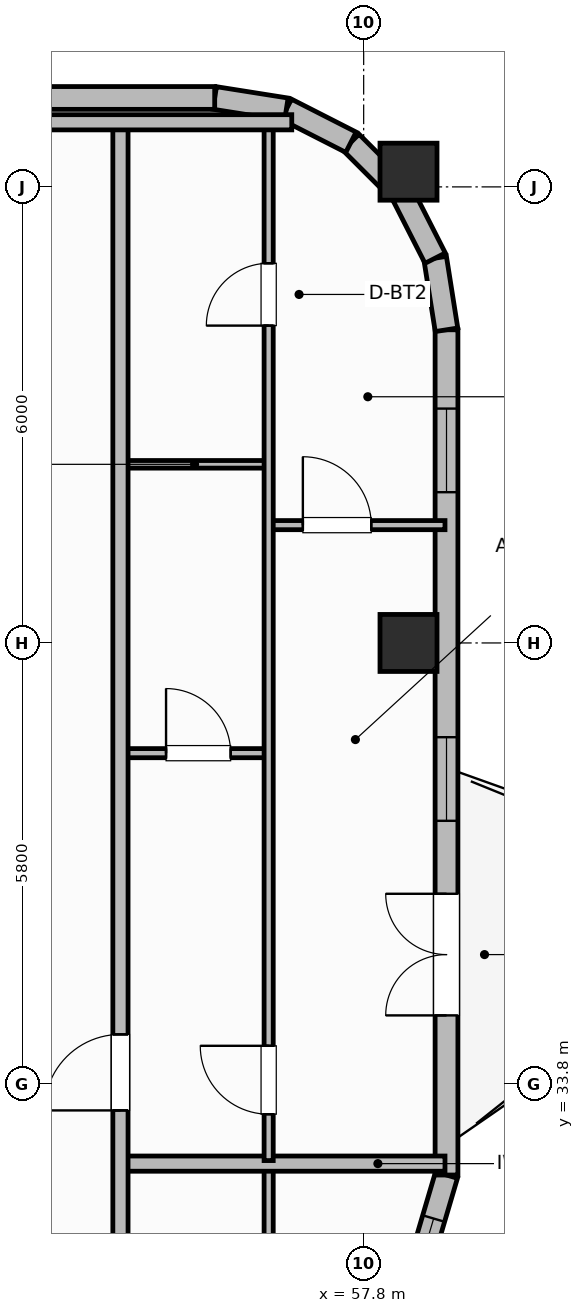
"""IFC4 building model, lengths in metres.
Left out: names, types, materials, properties, quantities, classifications, styles, units other than length and angle.
Written with IfcOpenShell. Run it as: python <this file> out.ifc"""

import sys

from ifc_helpers import new_model, si_unit, direction, frame, frame_2d, origin, origin_2d, place, context, subcontext, project, spatial, rectangle, extrude, element, fill, save


model = new_model("IFC4")
c1 = context("Model", 3, precision=1e-05, world=origin(), true_north=direction((0.0, 1.0)))
c2 = subcontext(c1, "Body", "Model", "MODEL_VIEW")
j1 = project(units=[si_unit("LENGTHUNIT", "METRE"), si_unit("PLANEANGLEUNIT", "RADIAN")], contexts=[c1])
p1 = place(None, origin())
s1 = spatial("IfcSite", under=j1, at=p1, CompositionType="ELEMENT")
p2 = place(p1, origin())
s2 = spatial("IfcBuilding", under=s1, at=p2, CompositionType="ELEMENT")
p3 = place(p2, frame((0.0, 0.0, 282.4)))
s3 = spatial("IfcBuildingStorey", under=s2, at=p3, CompositionType="ELEMENT", Elevation=282.4)
for number, where, z_axis, x_axis in (
    (1, (58.39, 39.6, 0.0), (0.0, 0.0, 1.0), (1.0, 0.0, 0.0)),
    (2, (58.39, 45.8, 0.0), (0.0, 0.0, 1.0), (1.0, 0.0, 0.0)),
):
    element("IfcColumn", number, at=place(p3, frame(where, z_axis=z_axis, x_axis=x_axis)), inside=s3, PredefinedType="COLUMN", context=c2, shape_type="SweptSolid", body=[
        extrude(rectangle(XDim=0.75, YDim=0.75, at=origin_2d()), origin(), (0.0, 0.0, 1.0), 3.7),
    ])
p4 = place(p3, frame((58.24, 30.4, 0.0), z_axis=(0.0, 0.0, 1.0), x_axis=(0.28328385701, 0.959036107953, 0.0)))
e3 = element("IfcWall", 3, at=p4, inside=s3, PredefinedType="SOLIDWALL", context=c2, shape_type="SweptSolid", body=[
    extrude(rectangle(XDim=2.294, YDim=0.3, at=frame_2d((1.147, 0.0))), origin(), (0.0, 0.0, 1.0), 2.73),
])
p5 = place(p4, frame((0.597, 0.0, 0.92)))
e4 = element("IfcOpeningElement", 4, at=p5, cuts=e3, PredefinedType="OPENING", context=c2, shape_type="SweptSolid", body=[
    extrude(rectangle(XDim=1.1, YDim=1.65, at=frame_2d((0.55, 0.825))), frame((0.0, 0.16, 0.0), z_axis=(0.0, -1.0, 0.0), x_axis=(1.0, 0.0, 0.0)), (0.0, 0.0, 1.0), 0.32),
])
p6 = place(p3, frame((58.89, 32.6, 0.0), z_axis=(0.0, 0.0, 1.0), x_axis=(0.0, 1.0, 0.0)))
e5 = element("IfcWall", 5, at=p6, inside=s3, PredefinedType="SOLIDWALL", context=c2, shape_type="SweptSolid", body=[
    extrude(rectangle(XDim=11.12, YDim=0.3, at=frame_2d((5.56, 0.0))), origin(), (0.0, 0.0, 1.0), 2.73),
])
p7 = place(p6, frame((2.1, 0.0, 0.0)))
e6 = element("IfcOpeningElement", 6, at=p7, cuts=e5, PredefinedType="OPENING", context=c2, shape_type="SweptSolid", body=[
    extrude(rectangle(XDim=1.6, YDim=2.1, at=frame_2d((0.8, 1.05))), frame((0.0, 0.16, 0.0), z_axis=(0.0, -1.0, 0.0), x_axis=(1.0, 0.0, 0.0)), (0.0, 0.0, 1.0), 0.32),
])
p8 = place(p6, frame((4.66, 0.0, 0.95)))
e7 = element("IfcOpeningElement", 7, at=p8, cuts=e5, PredefinedType="OPENING", context=c2, shape_type="SweptSolid", body=[
    extrude(rectangle(XDim=1.1, YDim=1.65, at=frame_2d((0.55, 0.825))), frame((0.0, 0.16, 0.0), z_axis=(0.0, -1.0, 0.0), x_axis=(1.0, 0.0, 0.0)), (0.0, 0.0, 1.0), 0.32),
])
p9 = place(p6, frame((8.983, 0.0, 0.95)))
e8 = element("IfcOpeningElement", 8, at=p9, cuts=e5, PredefinedType="OPENING", context=c2, shape_type="SweptSolid", body=[
    extrude(rectangle(XDim=1.1, YDim=1.65, at=frame_2d((0.55, 0.825))), frame((0.0, 0.16, 0.0), z_axis=(0.0, -1.0, 0.0), x_axis=(1.0, 0.0, 0.0)), (0.0, 0.0, 1.0), 0.32),
])
p10 = place(p3, frame((58.89, 43.72, 0.0), z_axis=(0.0, 0.0, 1.0), x_axis=(-0.156304114255, 0.987708977314, 0.0)))
e9 = element("IfcWall", 9, at=p10, inside=s3, PredefinedType="SOLIDWALL", context=c2, shape_type="SweptSolid", body=[
    extrude(rectangle(XDim=0.954, YDim=0.3, at=frame_2d((0.477, 0.0))), origin(), (0.0, 0.0, 1.0), 2.73),
])
p11 = place(p3, frame((58.741, 44.663, 0.0), z_axis=(0.0, 0.0, 1.0), x_axis=(-0.45395644796, 0.891023873617, 0.0)))
e10 = element("IfcWall", 10, at=p11, inside=s3, PredefinedType="SOLIDWALL", context=c2, shape_type="SweptSolid", body=[
    extrude(rectangle(XDim=0.954, YDim=0.3, at=frame_2d((0.477, 0.0))), origin(), (0.0, 0.0, 1.0), 2.73),
])
for number, where, z_axis, x_axis in (
    (11, (58.308, 45.513, 0.0), (0.0, 0.0, 1.0), (-0.707, 0.707, 0.0)),
    (12, (57.633, 46.188, 0.0), (0.0, 0.0, 1.0), (-0.891, 0.454, 0.0)),
):
    element("IfcWall", number, at=place(p3, frame(where, z_axis=z_axis, x_axis=x_axis)), inside=s3, PredefinedType="SOLIDWALL", context=c2, shape_type="SweptSolid", body=[
        extrude(rectangle(XDim=0.954, YDim=0.3, at=frame_2d((0.477, 0.0))), origin(), (0.0, 0.0, 1.0), 2.73),
    ])
p12 = place(p3, frame((56.782, 46.621, 0.0), z_axis=(0.0, 0.0, 1.0), x_axis=(-0.987663181641, 0.156593229835, 0.0)))
e13 = element("IfcWall", 13, at=p12, inside=s3, PredefinedType="SOLIDWALL", context=c2, shape_type="SweptSolid", body=[
    extrude(rectangle(XDim=0.954, YDim=0.3, at=frame_2d((0.477, 0.0))), origin(), (0.0, 0.0, 1.0), 2.73),
])
p13 = place(p3, frame((55.84, 46.77, 0.0), z_axis=(0.0, 0.0, 1.0), x_axis=(-1.0, 0.0, 0.0)))
e14 = element("IfcWall", 14, at=p13, inside=s3, PredefinedType="SOLIDWALL", context=c2, shape_type="SweptSolid", body=[
    extrude(rectangle(XDim=33.28, YDim=0.3, at=frame_2d((16.64, 0.0))), origin(), (0.0, 0.0, 1.0), 2.73),
])
p14 = place(p13, frame((5.596, 0.0, 0.71)))
e15 = element("IfcOpeningElement", 15, at=p14, cuts=e14, PredefinedType="OPENING", context=c2, shape_type="SweptSolid", body=[
    extrude(rectangle(XDim=2.1, YDim=1.9, at=frame_2d((1.05, 0.95))), frame((0.0, 0.16, 0.0), z_axis=(0.0, -1.0, 0.0), x_axis=(1.0, 0.0, 0.0)), (0.0, 0.0, 1.0), 0.32),
])
p15 = place(p13, frame((9.244, 0.0, 0.71)))
e16 = element("IfcOpeningElement", 16, at=p15, cuts=e14, PredefinedType="OPENING", context=c2, shape_type="SweptSolid", body=[
    extrude(rectangle(XDim=2.1, YDim=1.9, at=frame_2d((1.05, 0.95))), frame((0.0, 0.16, 0.0), z_axis=(0.0, -1.0, 0.0), x_axis=(1.0, 0.0, 0.0)), (0.0, 0.0, 1.0), 0.32),
])
p16 = place(p13, frame((13.941, 0.0, 0.71)))
e17 = element("IfcOpeningElement", 17, at=p16, cuts=e14, PredefinedType="OPENING", context=c2, shape_type="SweptSolid", body=[
    extrude(rectangle(XDim=2.1, YDim=1.9, at=frame_2d((1.05, 0.95))), frame((0.0, 0.16, 0.0), z_axis=(0.0, -1.0, 0.0), x_axis=(1.0, 0.0, 0.0)), (0.0, 0.0, 1.0), 0.32),
])
p17 = place(p13, frame((17.239, 0.0, 0.71)))
e18 = element("IfcOpeningElement", 18, at=p17, cuts=e14, PredefinedType="OPENING", context=c2, shape_type="SweptSolid", body=[
    extrude(rectangle(XDim=2.1, YDim=1.9, at=frame_2d((1.05, 0.95))), frame((0.0, 0.16, 0.0), z_axis=(0.0, -1.0, 0.0), x_axis=(1.0, 0.0, 0.0)), (0.0, 0.0, 1.0), 0.32),
])
p18 = place(p13, frame((21.936, 0.0, 0.71)))
e19 = element("IfcOpeningElement", 19, at=p18, cuts=e14, PredefinedType="OPENING", context=c2, shape_type="SweptSolid", body=[
    extrude(rectangle(XDim=2.1, YDim=1.9, at=frame_2d((1.05, 0.95))), frame((0.0, 0.16, 0.0), z_axis=(0.0, -1.0, 0.0), x_axis=(1.0, 0.0, 0.0)), (0.0, 0.0, 1.0), 0.32),
])
p19 = place(p13, frame((25.584, 0.0, 0.71)))
e20 = element("IfcOpeningElement", 20, at=p19, cuts=e14, PredefinedType="OPENING", context=c2, shape_type="SweptSolid", body=[
    extrude(rectangle(XDim=2.1, YDim=1.9, at=frame_2d((1.05, 0.95))), frame((0.0, 0.16, 0.0), z_axis=(0.0, -1.0, 0.0), x_axis=(1.0, 0.0, 0.0)), (0.0, 0.0, 1.0), 0.32),
])
p20 = place(p3, frame((56.55, 9.99, 0.0), z_axis=(0.0, 0.0, 1.0), x_axis=(0.0, 1.0, 0.0)))
e21 = element("IfcWall", 21, at=p20, inside=s3, PredefinedType="PARTITIONING", context=c2, shape_type="SweptSolid", body=[
    extrude(rectangle(XDim=22.72, YDim=0.12, at=frame_2d((11.36, 0.0))), origin(), (0.0, 0.0, 1.0), 2.56),
])
p21 = place(p20, frame((0.41, 0.0, 0.0)))
e22 = element("IfcOpeningElement", 22, at=p21, cuts=e21, PredefinedType="OPENING", context=c2, shape_type="SweptSolid", body=[
    extrude(rectangle(XDim=0.9, YDim=2.1, at=frame_2d((0.45, 1.05))), frame((0.0, 0.07, 0.0), z_axis=(0.0, -1.0, 0.0), x_axis=(1.0, 0.0, 0.0)), (0.0, 0.0, 1.0), 0.14),
])
p22 = place(p20, frame((15.535, 0.0, 0.0)))
e23 = element("IfcOpeningElement", 23, at=p22, cuts=e21, PredefinedType="OPENING", context=c2, shape_type="SweptSolid", body=[
    extrude(rectangle(XDim=0.82, YDim=2.08, at=frame_2d((0.41, 1.04))), frame((0.0, 0.07, 0.0), z_axis=(0.0, -1.0, 0.0), x_axis=(1.0, 0.0, 0.0)), (0.0, 0.0, 1.0), 0.14),
])
p23 = place(p3, frame((54.6, 32.75, 0.0), z_axis=(0.0, 0.0, 1.0), x_axis=(1.0, 0.0, 0.0)))
e24 = element("IfcWall", 24, at=p23, inside=s3, PredefinedType="PARTITIONING", context=c2, shape_type="SweptSolid", body=[
    extrude(rectangle(XDim=4.27, YDim=0.2, at=frame_2d((2.135, 0.0))), origin(), (0.0, 0.0, 1.0), 2.56),
])
p24 = place(p3, frame((54.6, 38.15, 0.0), z_axis=(0.0, 0.0, 1.0), x_axis=(1.0, 0.0, 0.0)))
e25 = element("IfcWall", 25, at=p24, inside=s3, PredefinedType="PARTITIONING", context=c2, shape_type="SweptSolid", body=[
    extrude(rectangle(XDim=1.95, YDim=0.12, at=frame_2d((0.975, 0.0))), origin(), (0.0, 0.0, 1.0), 2.56),
])
p25 = place(p24, frame((0.6, 0.0, 0.0)))
e26 = element("IfcOpeningElement", 26, at=p25, cuts=e25, PredefinedType="OPENING", context=c2, shape_type="SweptSolid", body=[
    extrude(rectangle(XDim=0.85, YDim=2.1, at=frame_2d((0.425, 1.05))), frame((0.0, 0.07, 0.0), z_axis=(0.0, -1.0, 0.0), x_axis=(1.0, 0.0, 0.0)), (0.0, 0.0, 1.0), 0.14),
])
p26 = place(p3, frame((54.6, 41.95, 0.0), z_axis=(0.0, 0.0, 1.0), x_axis=(1.0, 0.0, 0.0)))
e27 = element("IfcWall", 27, at=p26, inside=s3, PredefinedType="PARTITIONING", context=c2, shape_type="SweptSolid", body=[
    extrude(rectangle(XDim=1.95, YDim=0.1, at=frame_2d((0.975, 0.0))), origin(), (0.0, 0.0, 1.0), 2.56),
])
p27 = place(p3, frame((56.55, 41.15, 0.0), z_axis=(0.0, 0.0, 1.0), x_axis=(1.0, 0.0, 0.0)))
e28 = element("IfcWall", 28, at=p27, inside=s3, PredefinedType="PARTITIONING", context=c2, shape_type="SweptSolid", body=[
    extrude(rectangle(XDim=2.32, YDim=0.12, at=frame_2d((1.16, 0.0))), origin(), (0.0, 0.0, 1.0), 2.56),
])
p28 = place(p27, frame((0.45, 0.0, 0.0)))
e29 = element("IfcOpeningElement", 29, at=p28, cuts=e28, PredefinedType="OPENING", context=c2, shape_type="SweptSolid", body=[
    extrude(rectangle(XDim=0.9, YDim=2.1, at=frame_2d((0.45, 1.05))), frame((0.0, 0.07, 0.0), z_axis=(0.0, -1.0, 0.0), x_axis=(1.0, 0.0, 0.0)), (0.0, 0.0, 1.0), 0.14),
])
p29 = place(p3, frame((56.55, 32.79, 0.0), z_axis=(0.0, 0.0, 1.0), x_axis=(0.0, 1.0, 0.0)))
e30 = element("IfcWall", 30, at=p29, inside=s3, PredefinedType="PARTITIONING", context=c2, shape_type="SweptSolid", body=[
    extrude(rectangle(XDim=13.62, YDim=0.12, at=frame_2d((6.81, 0.0))), origin(), (0.0, 0.0, 1.0), 2.56),
])
p30 = place(p29, frame((0.61, 0.0, 0.0)))
e31 = element("IfcOpeningElement", 31, at=p30, cuts=e30, PredefinedType="OPENING", context=c2, shape_type="SweptSolid", body=[
    extrude(rectangle(XDim=0.9, YDim=2.1, at=frame_2d((0.45, 1.05))), frame((0.0, 0.07, 0.0), z_axis=(0.0, -1.0, 0.0), x_axis=(1.0, 0.0, 0.0)), (0.0, 0.0, 1.0), 0.14),
])
p31 = place(p29, frame((10.985, 0.0, 0.0)))
e32 = element("IfcOpeningElement", 32, at=p31, cuts=e30, PredefinedType="OPENING", context=c2, shape_type="SweptSolid", body=[
    extrude(rectangle(XDim=0.82, YDim=2.08, at=frame_2d((0.41, 1.04))), frame((0.0, 0.07, 0.0), z_axis=(0.0, -1.0, 0.0), x_axis=(1.0, 0.0, 0.0)), (0.0, 0.0, 1.0), 0.14),
])
p32 = place(p3, frame((54.6, 9.95, 0.0), z_axis=(0.0, 0.0, 1.0), x_axis=(0.0, 1.0, 0.0)))
e33 = element("IfcWall", 33, at=p32, inside=s3, PredefinedType="PARTITIONING", context=c2, shape_type="SweptSolid", body=[
    extrude(rectangle(XDim=36.5, YDim=0.2, at=frame_2d((18.25, 0.0))), origin(), (0.0, 0.0, 1.0), 2.56),
])
p33 = place(p32, frame((3.25, 0.0, 0.0)))
e34 = element("IfcOpeningElement", 34, at=p33, cuts=e33, PredefinedType="OPENING", context=c2, shape_type="SweptSolid", body=[
    extrude(rectangle(XDim=1.0, YDim=2.15, at=frame_2d((0.5, 1.075))), frame((0.0, 0.11, 0.0), z_axis=(0.0, -1.0, 0.0), x_axis=(1.0, 0.0, 0.0)), (0.0, 0.0, 1.0), 0.22),
])
p34 = place(p32, frame((23.5, 0.0, 0.0)))
e35 = element("IfcOpeningElement", 35, at=p34, cuts=e33, PredefinedType="OPENING", context=c2, shape_type="SweptSolid", body=[
    extrude(rectangle(XDim=1.0, YDim=2.15, at=frame_2d((0.5, 1.075))), frame((0.0, 0.11, 0.0), z_axis=(0.0, -1.0, 0.0), x_axis=(1.0, 0.0, 0.0)), (0.0, 0.0, 1.0), 0.22),
])
p35 = place(p3, frame((53.1, 46.45, 0.0), z_axis=(0.0, 0.0, 1.0), x_axis=(1.0, 0.0, 0.0)))
e36 = element("IfcWall", 36, at=p35, inside=s3, PredefinedType="PARTITIONING", context=c2, shape_type="SweptSolid", body=[
    extrude(rectangle(XDim=3.754, YDim=0.2, at=frame_2d((1.877, 0.0))), origin(), (0.0, 0.0, 1.0), 2.56),
])
p36 = place(p5, origin())
e37 = element("IfcWindow", 37, at=p36, inside=s3, PartitioningType="SINGLE_PANEL", PredefinedType="WINDOW", context=c2, shape_type="SweptSolid", body=[
    extrude(rectangle(XDim=1.1, YDim=1.65, at=frame_2d((0.55, 0.825))), frame((0.0, 0.03, 0.0), z_axis=(0.0, -1.0, 0.0), x_axis=(1.0, 0.0, 0.0)), (0.0, 0.0, 1.0), 0.06),
])
fill(e4, e37)
p37 = place(p7, origin())
e38 = element("IfcDoor", 38, at=p37, inside=s3, OperationType="DOUBLE_DOOR_SINGLE_SWING", PredefinedType="DOOR", context=c2, shape_type="SweptSolid", body=[
    extrude(rectangle(XDim=1.6, YDim=2.1, at=frame_2d((0.8, 1.05))), frame((0.0, 0.025, 0.0), z_axis=(0.0, -1.0, 0.0), x_axis=(1.0, 0.0, 0.0)), (0.0, 0.0, 1.0), 0.05),
])
fill(e6, e38)
p38 = place(p8, origin())
e39 = element("IfcWindow", 39, at=p38, inside=s3, PartitioningType="SINGLE_PANEL", PredefinedType="WINDOW", context=c2, shape_type="SweptSolid", body=[
    extrude(rectangle(XDim=1.1, YDim=1.65, at=frame_2d((0.55, 0.825))), frame((0.0, 0.03, 0.0), z_axis=(0.0, -1.0, 0.0), x_axis=(1.0, 0.0, 0.0)), (0.0, 0.0, 1.0), 0.06),
])
fill(e7, e39)
p39 = place(p9, origin())
e40 = element("IfcWindow", 40, at=p39, inside=s3, PartitioningType="SINGLE_PANEL", PredefinedType="WINDOW", context=c2, shape_type="SweptSolid", body=[
    extrude(rectangle(XDim=1.1, YDim=1.65, at=frame_2d((0.55, 0.825))), frame((0.0, 0.03, 0.0), z_axis=(0.0, -1.0, 0.0), x_axis=(1.0, 0.0, 0.0)), (0.0, 0.0, 1.0), 0.06),
])
fill(e8, e40)
p40 = place(p25, origin())
e41 = element("IfcDoor", 41, at=p40, inside=s3, OperationType="SINGLE_SWING_LEFT", PredefinedType="DOOR", context=c2, shape_type="SweptSolid", body=[
    extrude(rectangle(XDim=0.85, YDim=2.1, at=frame_2d((0.425, 1.05))), frame((0.0, 0.025, 0.0), z_axis=(0.0, -1.0, 0.0), x_axis=(1.0, 0.0, 0.0)), (0.0, 0.0, 1.0), 0.05),
])
fill(e26, e41)
p41 = place(p28, origin())
e42 = element("IfcDoor", 42, at=p41, inside=s3, OperationType="SINGLE_SWING_LEFT", PredefinedType="DOOR", context=c2, shape_type="SweptSolid", body=[
    extrude(rectangle(XDim=0.9, YDim=2.1, at=frame_2d((0.45, 1.05))), frame((0.0, 0.025, 0.0), z_axis=(0.0, -1.0, 0.0), x_axis=(1.0, 0.0, 0.0)), (0.0, 0.0, 1.0), 0.05),
])
fill(e29, e42)
p42 = place(p30, origin())
e43 = element("IfcDoor", 43, at=p42, inside=s3, OperationType="SINGLE_SWING_RIGHT", PredefinedType="DOOR", context=c2, shape_type="SweptSolid", body=[
    extrude(rectangle(XDim=0.9, YDim=2.1, at=frame_2d((0.45, 1.05))), frame((0.0, 0.025, 0.0), z_axis=(0.0, -1.0, 0.0), x_axis=(1.0, 0.0, 0.0)), (0.0, 0.0, 1.0), 0.05),
])
fill(e31, e43)
p43 = place(p31, origin())
e44 = element("IfcDoor", 44, at=p43, inside=s3, OperationType="SINGLE_SWING_LEFT", PredefinedType="DOOR", context=c2, shape_type="SweptSolid", body=[
    extrude(rectangle(XDim=0.82, YDim=2.08, at=frame_2d((0.41, 1.04))), frame((0.0, 0.025, 0.0), z_axis=(0.0, -1.0, 0.0), x_axis=(1.0, 0.0, 0.0)), (0.0, 0.0, 1.0), 0.05),
])
fill(e32, e44)
p44 = place(p34, origin())
e45 = element("IfcDoor", 45, at=p44, inside=s3, OperationType="SINGLE_SWING_LEFT", PredefinedType="DOOR", context=c2, shape_type="SweptSolid", body=[
    extrude(rectangle(XDim=1.0, YDim=2.15, at=frame_2d((0.5, 1.075))), frame((0.0, 0.025, 0.0), z_axis=(0.0, -1.0, 0.0), x_axis=(1.0, 0.0, 0.0)), (0.0, 0.0, 1.0), 0.05),
])
fill(e35, e45)
save(model, sys.argv[1])
